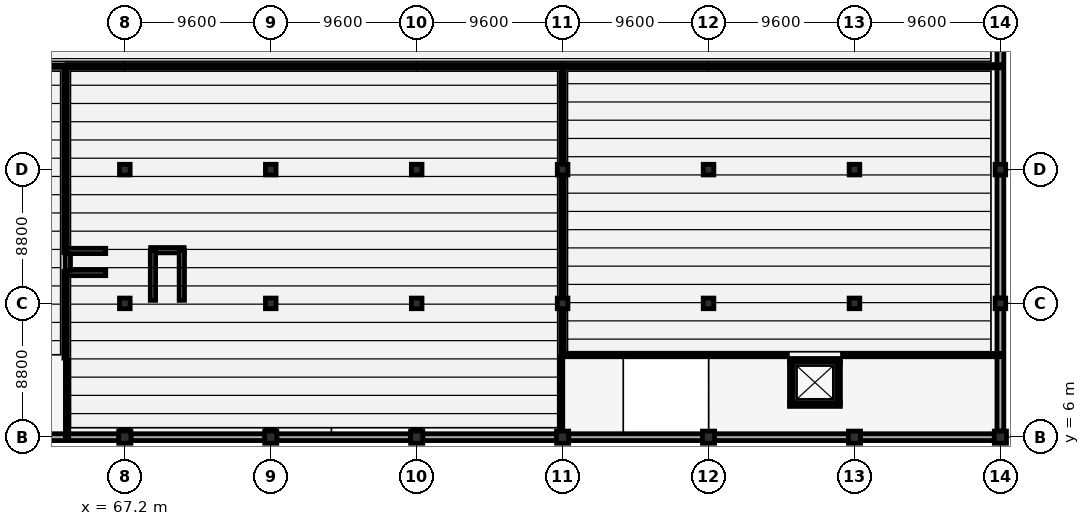
"""IFC4 building model, lengths in metres.
Left out: names, types, materials, properties, quantities, classifications, styles, units other than length and angle.
Written with IfcOpenShell. Run it as: python <this file> out.ifc"""

import sys

from ifc_helpers import new_model, si_unit, direction, frame, frame_2d, origin, origin_2d, place, context, subcontext, project, spatial, rectangle, extrude, element, fill, save


model = new_model("IFC4")
c1 = context("Model", 3, precision=1e-05, world=origin(), true_north=direction((0.0, 1.0)))
c2 = subcontext(c1, "Body", "Model", "MODEL_VIEW")
j1 = project(units=[si_unit("LENGTHUNIT", "METRE"), si_unit("PLANEANGLEUNIT", "RADIAN")], contexts=[c1])
p1 = place(None, origin())
s1 = spatial("IfcSite", under=j1, at=p1, CompositionType="ELEMENT")
p2 = place(p1, origin())
s2 = spatial("IfcBuilding", under=s1, at=p2, CompositionType="ELEMENT")
p3 = place(p2, frame((0.0, 0.0, -4.2)))
s3 = spatial("IfcBuildingStorey", under=s2, at=p3, CompositionType="ELEMENT", Elevation=-4.2)
p4 = place(p3, frame((67.2, 6.0, 0.0), z_axis=(0.0, 0.0, 1.0), x_axis=(1.0, 0.0, 0.0)))
e1 = element("IfcColumn", 1, at=p4, inside=s3, PredefinedType="COLUMN", context=c2, shape_type="SweptSolid", body=[
    extrude(rectangle(XDim=0.8, YDim=0.8, at=origin_2d()), origin(), (0.0, 0.0, 1.0), 4.2),
])
for number, where, z_axis, x_axis in (
    (2, (67.2, 14.8, 0.0), (0.0, 0.0, 1.0), (1.0, 0.0, 0.0)),
    (3, (67.2, 23.6, 0.0), (0.0, 0.0, 1.0), (1.0, 0.0, 0.0)),
):
    element("IfcColumn", number, at=place(p3, frame(where, z_axis=z_axis, x_axis=x_axis)), inside=s3, PredefinedType="COLUMN", context=c2, shape_type="SweptSolid", body=[
        extrude(rectangle(XDim=0.7, YDim=0.7, at=origin_2d()), origin(), (0.0, 0.0, 1.0), 4.2),
    ])
p5 = place(p3, frame((76.8, 6.0, 0.0), z_axis=(0.0, 0.0, 1.0), x_axis=(1.0, 0.0, 0.0)))
e4 = element("IfcColumn", 4, at=p5, inside=s3, PredefinedType="COLUMN", context=c2, shape_type="SweptSolid", body=[
    extrude(rectangle(XDim=0.8, YDim=0.8, at=origin_2d()), origin(), (0.0, 0.0, 1.0), 4.2),
])
for number, where, z_axis, x_axis in (
    (5, (76.8, 14.8, 0.0), (0.0, 0.0, 1.0), (1.0, 0.0, 0.0)),
    (6, (76.8, 23.6, 0.0), (0.0, 0.0, 1.0), (1.0, 0.0, 0.0)),
):
    element("IfcColumn", number, at=place(p3, frame(where, z_axis=z_axis, x_axis=x_axis)), inside=s3, PredefinedType="COLUMN", context=c2, shape_type="SweptSolid", body=[
        extrude(rectangle(XDim=0.7, YDim=0.7, at=origin_2d()), origin(), (0.0, 0.0, 1.0), 4.2),
    ])
p6 = place(p3, frame((86.4, 6.0, 0.0), z_axis=(0.0, 0.0, 1.0), x_axis=(1.0, 0.0, 0.0)))
e7 = element("IfcColumn", 7, at=p6, inside=s3, PredefinedType="COLUMN", context=c2, shape_type="SweptSolid", body=[
    extrude(rectangle(XDim=0.8, YDim=0.8, at=origin_2d()), origin(), (0.0, 0.0, 1.0), 4.2),
])
for number, where, z_axis, x_axis in (
    (8, (86.4, 14.8, 0.0), (0.0, 0.0, 1.0), (1.0, 0.0, 0.0)),
    (9, (86.4, 23.6, 0.0), (0.0, 0.0, 1.0), (1.0, 0.0, 0.0)),
):
    element("IfcColumn", number, at=place(p3, frame(where, z_axis=z_axis, x_axis=x_axis)), inside=s3, PredefinedType="COLUMN", context=c2, shape_type="SweptSolid", body=[
        extrude(rectangle(XDim=0.7, YDim=0.7, at=origin_2d()), origin(), (0.0, 0.0, 1.0), 4.2),
    ])
p7 = place(p3, frame((96.0, 6.0, 0.0), z_axis=(0.0, 0.0, 1.0), x_axis=(1.0, 0.0, 0.0)))
e10 = element("IfcColumn", 10, at=p7, inside=s3, PredefinedType="COLUMN", context=c2, shape_type="SweptSolid", body=[
    extrude(rectangle(XDim=0.8, YDim=0.8, at=origin_2d()), origin(), (0.0, 0.0, 1.0), 4.2),
])
for number, where, z_axis, x_axis in (
    (11, (96.0, 14.8, 0.0), (0.0, 0.0, 1.0), (1.0, 0.0, 0.0)),
    (12, (96.0, 23.6, 0.0), (0.0, 0.0, 1.0), (1.0, 0.0, 0.0)),
):
    element("IfcColumn", number, at=place(p3, frame(where, z_axis=z_axis, x_axis=x_axis)), inside=s3, PredefinedType="COLUMN", context=c2, shape_type="SweptSolid", body=[
        extrude(rectangle(XDim=0.7, YDim=0.7, at=origin_2d()), origin(), (0.0, 0.0, 1.0), 4.2),
    ])
p8 = place(p3, frame((105.6, 6.0, 0.0), z_axis=(0.0, 0.0, 1.0), x_axis=(1.0, 0.0, 0.0)))
e13 = element("IfcColumn", 13, at=p8, inside=s3, PredefinedType="COLUMN", context=c2, shape_type="SweptSolid", body=[
    extrude(rectangle(XDim=0.8, YDim=0.8, at=origin_2d()), origin(), (0.0, 0.0, 1.0), 4.2),
])
for number, where, z_axis, x_axis in (
    (14, (105.6, 14.8, 0.0), (0.0, 0.0, 1.0), (1.0, 0.0, 0.0)),
    (15, (105.6, 23.6, 0.0), (0.0, 0.0, 1.0), (1.0, 0.0, 0.0)),
):
    element("IfcColumn", number, at=place(p3, frame(where, z_axis=z_axis, x_axis=x_axis)), inside=s3, PredefinedType="COLUMN", context=c2, shape_type="SweptSolid", body=[
        extrude(rectangle(XDim=0.7, YDim=0.7, at=origin_2d()), origin(), (0.0, 0.0, 1.0), 4.2),
    ])
p9 = place(p3, frame((115.2, 6.0, 0.0), z_axis=(0.0, 0.0, 1.0), x_axis=(1.0, 0.0, 0.0)))
e16 = element("IfcColumn", 16, at=p9, inside=s3, PredefinedType="COLUMN", context=c2, shape_type="SweptSolid", body=[
    extrude(rectangle(XDim=0.8, YDim=0.8, at=origin_2d()), origin(), (0.0, 0.0, 1.0), 4.2),
])
for number, where, z_axis, x_axis in (
    (17, (115.2, 14.8, 0.0), (0.0, 0.0, 1.0), (1.0, 0.0, 0.0)),
    (18, (115.2, 23.6, 0.0), (0.0, 0.0, 1.0), (1.0, 0.0, 0.0)),
):
    element("IfcColumn", number, at=place(p3, frame(where, z_axis=z_axis, x_axis=x_axis)), inside=s3, PredefinedType="COLUMN", context=c2, shape_type="SweptSolid", body=[
        extrude(rectangle(XDim=0.7, YDim=0.7, at=origin_2d()), origin(), (0.0, 0.0, 1.0), 4.2),
    ])
p10 = place(p3, frame((124.8, 6.0, 0.0), z_axis=(0.0, 0.0, 1.0), x_axis=(1.0, 0.0, 0.0)))
e19 = element("IfcColumn", 19, at=p10, inside=s3, PredefinedType="COLUMN", context=c2, shape_type="SweptSolid", body=[
    extrude(rectangle(XDim=0.8, YDim=0.8, at=origin_2d()), origin(), (0.0, 0.0, 1.0), 4.2),
])
for number, where, z_axis, x_axis in (
    (20, (124.8, 14.8, 0.0), (0.0, 0.0, 1.0), (1.0, 0.0, 0.0)),
    (21, (124.8, 23.6, 0.0), (0.0, 0.0, 1.0), (1.0, 0.0, 0.0)),
):
    element("IfcColumn", number, at=place(p3, frame(where, z_axis=z_axis, x_axis=x_axis)), inside=s3, PredefinedType="COLUMN", context=c2, shape_type="SweptSolid", body=[
        extrude(rectangle(XDim=0.7, YDim=0.7, at=origin_2d()), origin(), (0.0, 0.0, 1.0), 4.2),
    ])
p11 = place(p3, frame((58.0, 6.0, 0.0), z_axis=(0.0, 0.0, 1.0), x_axis=(1.0, 0.0, 0.0)))
e22 = element("IfcWall", 22, at=p11, inside=s3, PredefinedType="SOLIDWALL", context=c2, shape_type="SweptSolid", body=[
    extrude(rectangle(XDim=8.8, YDim=0.45, at=frame_2d((4.4, 0.0))), origin(), (0.0, 0.0, 1.0), 3.84),
])
p12 = place(p3, frame((67.6, 6.0, 0.0), z_axis=(0.0, 0.0, 1.0), x_axis=(1.0, 0.0, 0.0)))
e23 = element("IfcWall", 23, at=p12, inside=s3, PredefinedType="SOLIDWALL", context=c2, shape_type="SweptSolid", body=[
    extrude(rectangle(XDim=8.8, YDim=0.45, at=frame_2d((4.4, 0.0))), origin(), (0.0, 0.0, 1.0), 3.84),
])
for number, where, z_axis, x_axis in (
    (24, (77.2, 6.0, 0.0), (0.0, 0.0, 1.0), (1.0, 0.0, 0.0)),
    (25, (86.8, 6.0, 0.0), (0.0, 0.0, 1.0), (1.0, 0.0, 0.0)),
    (26, (96.4, 6.0, 0.0), (0.0, 0.0, 1.0), (1.0, 0.0, 0.0)),
    (27, (106.0, 6.0, 0.0), (0.0, 0.0, 1.0), (1.0, 0.0, 0.0)),
):
    element("IfcWall", number, at=place(p3, frame(where, z_axis=z_axis, x_axis=x_axis)), inside=s3, PredefinedType="SOLIDWALL", context=c2, shape_type="SweptSolid", body=[
        extrude(rectangle(XDim=8.8, YDim=0.45, at=frame_2d((4.4, 0.0))), origin(), (0.0, 0.0, 1.0), 3.84),
    ])
p13 = place(p3, frame((115.6, 6.0, 0.0), z_axis=(0.0, 0.0, 1.0), x_axis=(1.0, 0.0, 0.0)))
e28 = element("IfcWall", 28, at=p13, inside=s3, PredefinedType="SOLIDWALL", context=c2, shape_type="SweptSolid", body=[
    extrude(rectangle(XDim=8.8, YDim=0.45, at=frame_2d((4.4, 0.0))), origin(), (0.0, 0.0, 1.0), 3.84),
])
p14 = place(p3, frame((124.8, 6.4, 0.0), z_axis=(0.0, 0.0, 1.0), x_axis=(0.0, 1.0, 0.0)))
e29 = element("IfcWall", 29, at=p14, inside=s3, PredefinedType="SOLIDWALL", context=c2, shape_type="SweptSolid", body=[
    extrude(rectangle(XDim=8.05, YDim=0.45, at=frame_2d((4.025, 0.0))), origin(), (0.0, 0.0, 1.0), 3.84),
])
for number, where, z_axis, x_axis in (
    (30, (124.8, 15.15, 0.0), (0.0, 0.0, 1.0), (0.0, 1.0, 0.0)),
    (31, (124.8, 23.95, 0.0), (0.0, 0.0, 1.0), (0.0, 1.0, 0.0)),
):
    element("IfcWall", number, at=place(p3, frame(where, z_axis=z_axis, x_axis=x_axis)), inside=s3, PredefinedType="SOLIDWALL", context=c2, shape_type="SweptSolid", body=[
        extrude(rectangle(XDim=8.1, YDim=0.45, at=frame_2d((4.05, 0.0))), origin(), (0.0, 0.0, 1.0), 3.84),
    ])
for number, where, z_axis, x_axis in (
    (32, (63.275, 16.8, 0.0), (0.0, 0.0, 1.0), (1.0, 0.0, 0.0)),
    (33, (63.275, 18.25, 0.0), (0.0, 0.0, 1.0), (1.0, 0.0, 0.0)),
):
    element("IfcWall", number, at=place(p3, frame(where, z_axis=z_axis, x_axis=x_axis)), inside=s3, PredefinedType="SHEAR", context=c2, shape_type="SweptSolid", body=[
        extrude(rectangle(XDim=2.67, YDim=0.35, at=frame_2d((1.335, 0.0))), origin(), (0.0, 0.0, 1.0), 3.92),
    ])
p15 = place(p3, frame((63.45, 16.975, 0.0), z_axis=(0.0, 0.0, 1.0), x_axis=(0.0, 1.0, 0.0)))
e34 = element("IfcWall", 34, at=p15, inside=s3, PredefinedType="SHEAR", context=c2, shape_type="SweptSolid", body=[
    extrude(rectangle(XDim=1.1, YDim=0.35, at=frame_2d((0.55, 0.0))), origin(), (0.0, 0.0, 1.0), 3.92),
])
p16 = place(p3, frame((68.9, 18.3, 0.0), z_axis=(0.0, 0.0, 1.0), x_axis=(1.0, 0.0, 0.0)))
e35 = element("IfcWall", 35, at=p16, inside=s3, PredefinedType="SHEAR", context=c2, shape_type="SweptSolid", body=[
    extrude(rectangle(XDim=2.2, YDim=0.35, at=frame_2d((1.1, 0.0))), origin(), (0.0, 0.0, 1.0), 3.92),
])
for number, where, z_axis, x_axis in (
    (36, (69.05, 15.0, 0.0), (0.0, 0.0, 1.0), (0.0, 1.0, 0.0)),
    (37, (70.95, 15.0, 0.0), (0.0, 0.0, 1.0), (0.0, 1.0, 0.0)),
):
    element("IfcWall", number, at=place(p3, frame(where, z_axis=z_axis, x_axis=x_axis)), inside=s3, PredefinedType="SHEAR", context=c2, shape_type="SweptSolid", body=[
        extrude(rectangle(XDim=3.3, YDim=0.35, at=frame_2d((1.65, 0.0))), origin(), (0.0, 0.0, 1.0), 3.92),
    ])
p17 = place(p3, frame((114.275, 8.15, -1.5), z_axis=(0.0, 0.0, 1.0), x_axis=(-1.0, 0.0, 0.0)))
e38 = element("IfcWall", 38, at=p17, inside=s3, PredefinedType="SOLIDWALL", context=c2, shape_type="SweptSolid", body=[
    extrude(rectangle(XDim=3.35, YDim=0.25, at=frame_2d((1.675, 0.0))), origin(), (0.0, 0.0, 1.0), 5.45),
])
p18 = place(p3, frame((110.925, 11.05, -1.5), z_axis=(0.0, 0.0, 1.0), x_axis=(1.0, 0.0, 0.0)))
e39 = element("IfcWall", 39, at=p18, inside=s3, PredefinedType="SOLIDWALL", context=c2, shape_type="SweptSolid", body=[
    extrude(rectangle(XDim=3.35, YDim=0.25, at=frame_2d((1.675, 0.0))), origin(), (0.0, 0.0, 1.0), 5.45),
])
p19 = place(p18, frame((0.775, 0.0, 1.5)))
e40 = element("IfcOpeningElement", 40, at=p19, cuts=e39, PredefinedType="OPENING", context=c2, shape_type="SweptSolid", body=[
    extrude(rectangle(XDim=1.8, YDim=2.3, at=frame_2d((0.9, 1.15))), frame((0.0, 0.135, 0.0), z_axis=(0.0, -1.0, 0.0), x_axis=(1.0, 0.0, 0.0)), (0.0, 0.0, 1.0), 0.27),
])
for number, where, z_axis, x_axis in (
    (41, (111.05, 8.275, -1.5), (0.0, 0.0, 1.0), (0.0, 1.0, 0.0)),
    (42, (114.15, 10.925, -1.5), (0.0, 0.0, 1.0), (0.0, -1.0, 0.0)),
):
    element("IfcWall", number, at=place(p3, frame(where, z_axis=z_axis, x_axis=x_axis)), inside=s3, PredefinedType="SOLIDWALL", context=c2, shape_type="SweptSolid", body=[
        extrude(rectangle(XDim=2.65, YDim=0.25, at=frame_2d((1.325, 0.0))), origin(), (0.0, 0.0, 1.0), 5.45),
    ])
p20 = place(p3, frame((63.3, 11.2, 0.0), z_axis=(0.0, 0.0, 1.0), x_axis=(0.0, 1.0, 0.0)))
e43 = element("IfcWall", 43, at=p20, inside=s3, PredefinedType="PARTITIONING", context=c2, shape_type="SweptSolid", body=[
    extrude(rectangle(XDim=5.695, YDim=0.22, at=frame_2d((2.848, 0.0))), origin(), (0.0, 0.0, 1.0), 3.84),
])
p21 = place(p20, frame((2.098, 0.0, 0.0)))
e44 = element("IfcOpeningElement", 44, at=p21, cuts=e43, PredefinedType="OPENING", context=c2, shape_type="SweptSolid", body=[
    extrude(rectangle(XDim=1.5, YDim=2.2, at=frame_2d((0.75, 1.1))), frame((0.0, 0.12, 0.0), z_axis=(0.0, -1.0, 0.0), x_axis=(1.0, 0.0, 0.0)), (0.0, 0.0, 1.0), 0.24),
])
p22 = place(p3, frame((63.3, 18.155, 0.0), z_axis=(0.0, 0.0, 1.0), x_axis=(0.0, 1.0, 0.0)))
e45 = element("IfcWall", 45, at=p22, inside=s3, PredefinedType="PARTITIONING", context=c2, shape_type="SweptSolid", body=[
    extrude(rectangle(XDim=12.145, YDim=0.22, at=frame_2d((6.073, 0.0))), origin(), (0.0, 0.0, 1.0), 3.84),
])
p23 = place(p22, frame((5.323, 0.0, 0.0)))
e46 = element("IfcOpeningElement", 46, at=p23, cuts=e45, PredefinedType="OPENING", context=c2, shape_type="SweptSolid", body=[
    extrude(rectangle(XDim=1.5, YDim=2.2, at=frame_2d((0.75, 1.1))), frame((0.0, 0.12, 0.0), z_axis=(0.0, -1.0, 0.0), x_axis=(1.0, 0.0, 0.0)), (0.0, 0.0, 1.0), 0.24),
])
p24 = place(p3, frame((55.8, 30.4, 0.0), z_axis=(0.0, 0.0, 1.0), x_axis=(1.0, 0.0, 0.0)))
e47 = element("IfcWall", 47, at=p24, inside=s3, PredefinedType="PARTITIONING", context=c2, shape_type="SweptSolid", body=[
    extrude(rectangle(XDim=7.4, YDim=0.16, at=frame_2d((3.7, 0.0))), origin(), (0.0, 0.0, 1.0), 3.84),
])
p25 = place(p24, frame((3.044, 0.0, 0.0)))
e48 = element("IfcOpeningElement", 48, at=p25, cuts=e47, PredefinedType="OPENING", context=c2, shape_type="SweptSolid", body=[
    extrude(rectangle(XDim=1.8, YDim=2.15, at=frame_2d((0.9, 1.075))), frame((0.0, 0.09, 0.0), z_axis=(0.0, -1.0, 0.0), x_axis=(1.0, 0.0, 0.0)), (0.0, 0.0, 1.0), 0.18),
])
p26 = place(p3, frame((96.0, 11.4, 0.0), z_axis=(0.0, 0.0, 1.0), x_axis=(0.0, 1.0, 0.0)))
e49 = element("IfcWall", 49, at=p26, inside=s3, PredefinedType="PARTITIONING", context=c2, shape_type="SweptSolid", body=[
    extrude(rectangle(XDim=18.9, YDim=0.22, at=frame_2d((9.45, 0.0))), origin(), (0.0, 0.0, 1.0), 3.199),
])
p27 = place(p3, frame((63.4, 30.4, 0.0), z_axis=(0.0, 0.0, 1.0), x_axis=(1.0, 0.0, 0.0)))
e50 = element("IfcWall", 50, at=p27, inside=s3, PredefinedType="PARTITIONING", context=c2, shape_type="SweptSolid", body=[
    extrude(rectangle(XDim=32.55, YDim=0.22, at=frame_2d((16.275, 0.0))), origin(), (0.0, 0.0, 1.0), 3.84),
])
p28 = place(p27, frame((15.525, 0.0, 0.0)))
e51 = element("IfcOpeningElement", 51, at=p28, cuts=e50, PredefinedType="OPENING", context=c2, shape_type="SweptSolid", body=[
    extrude(rectangle(XDim=1.5, YDim=2.2, at=frame_2d((0.75, 1.1))), frame((0.0, 0.12, 0.0), z_axis=(0.0, -1.0, 0.0), x_axis=(1.0, 0.0, 0.0)), (0.0, 0.0, 1.0), 0.24),
])
p29 = place(p3, frame((96.03, 30.4, 0.0), z_axis=(0.0, 0.0, 1.0), x_axis=(1.0, 0.0, 0.0)))
e52 = element("IfcWall", 52, at=p29, inside=s3, PredefinedType="PARTITIONING", context=c2, shape_type="SweptSolid", body=[
    extrude(rectangle(XDim=28.72, YDim=0.22, at=frame_2d((14.36, 0.0))), origin(), (0.0, 0.0, 1.0), 3.84),
])
p30 = place(p29, frame((13.61, 0.0, 0.0)))
e53 = element("IfcOpeningElement", 53, at=p30, cuts=e52, PredefinedType="OPENING", context=c2, shape_type="SweptSolid", body=[
    extrude(rectangle(XDim=1.5, YDim=2.2, at=frame_2d((0.75, 1.1))), frame((0.0, 0.12, 0.0), z_axis=(0.0, -1.0, 0.0), x_axis=(1.0, 0.0, 0.0)), (0.0, 0.0, 1.0), 0.24),
])
for number, where, z_axis, x_axis in (
    (54, (66.94, 6.4, 0.0), (0.0, 0.0, 1.0), (1.0, 0.0, 0.0)),
    (55, (76.54, 6.4, 0.0), (0.0, 0.0, 1.0), (1.0, 0.0, 0.0)),
    (56, (86.14, 6.4, 0.0), (0.0, 0.0, 1.0), (1.0, 0.0, 0.0)),
):
    element("IfcWall", number, at=place(p3, frame(where, z_axis=z_axis, x_axis=x_axis)), inside=s3, PredefinedType="PARTITIONING", context=c2, shape_type="SweptSolid", body=[
        extrude(rectangle(XDim=0.52, YDim=0.22, at=frame_2d((0.26, 0.0))), origin(), (0.0, 0.0, 1.0), 3.84),
    ])
p31 = place(p3, frame((63.4, 6.05, 0.0), z_axis=(0.0, 0.0, 1.0), x_axis=(0.0, 1.0, 0.0)))
e57 = element("IfcWall", 57, at=p31, inside=s3, PredefinedType="PARTITIONING", context=c2, shape_type="SweptSolid", body=[
    extrude(rectangle(XDim=5.01, YDim=0.22, at=frame_2d((2.505, 0.0))), origin(), (0.0, 0.0, 1.0), 3.84),
])
p32 = place(p3, frame((95.9, 6.05, 0.0), z_axis=(0.0, 0.0, 1.0), x_axis=(0.0, 1.0, 0.0)))
e58 = element("IfcWall", 58, at=p32, inside=s3, PredefinedType="PARTITIONING", context=c2, shape_type="SweptSolid", body=[
    extrude(rectangle(XDim=5.21, YDim=0.22, at=frame_2d((2.605, 0.0))), origin(), (0.0, 0.0, 1.0), 3.199),
])
p33 = place(p3, frame((95.95, 11.4, 0.0), z_axis=(0.0, 0.0, 1.0), x_axis=(1.0, 0.0, 0.0)))
e59 = element("IfcWall", 59, at=p33, inside=s3, PredefinedType="PARTITIONING", context=c2, shape_type="SweptSolid", body=[
    extrude(rectangle(XDim=14.835, YDim=0.22, at=frame_2d((7.417, 0.0))), origin(), (0.0, 0.0, 1.0), 3.84),
])
p34 = place(p3, frame((114.415, 11.4, 0.0), z_axis=(0.0, 0.0, 1.0), x_axis=(1.0, 0.0, 0.0)))
e60 = element("IfcWall", 60, at=p34, inside=s3, PredefinedType="PARTITIONING", context=c2, shape_type="SweptSolid", body=[
    extrude(rectangle(XDim=10.335, YDim=0.22, at=frame_2d((5.167, 0.0))), origin(), (0.0, 0.0, 1.0), 3.84),
])
p35 = place(p19, origin())
e61 = element("IfcDoor", 61, at=p35, inside=s3, OperationType="DOUBLE_DOOR_SLIDING", PredefinedType="DOOR", context=c2, shape_type="SweptSolid", body=[
    extrude(rectangle(XDim=1.8, YDim=2.3, at=frame_2d((0.9, 1.15))), frame((0.0, 0.025, 0.0), z_axis=(0.0, -1.0, 0.0), x_axis=(1.0, 0.0, 0.0)), (0.0, 0.0, 1.0), 0.05),
])
fill(e40, e61)
p36 = place(p21, origin())
e62 = element("IfcDoor", 62, at=p36, inside=s3, OperationType="SLIDING_TO_RIGHT", PredefinedType="DOOR", context=c2, shape_type="SweptSolid", body=[
    extrude(rectangle(XDim=1.5, YDim=2.2, at=frame_2d((0.75, 1.1))), frame((0.0, 0.025, 0.0), z_axis=(0.0, -1.0, 0.0), x_axis=(1.0, 0.0, 0.0)), (0.0, 0.0, 1.0), 0.05),
])
fill(e44, e62)
p37 = place(p23, origin())
e63 = element("IfcDoor", 63, at=p37, inside=s3, OperationType="SLIDING_TO_RIGHT", PredefinedType="DOOR", context=c2, shape_type="SweptSolid", body=[
    extrude(rectangle(XDim=1.5, YDim=2.2, at=frame_2d((0.75, 1.1))), frame((0.0, 0.025, 0.0), z_axis=(0.0, -1.0, 0.0), x_axis=(1.0, 0.0, 0.0)), (0.0, 0.0, 1.0), 0.05),
])
fill(e46, e63)
p38 = place(p28, origin())
e64 = element("IfcDoor", 64, at=p38, inside=s3, OperationType="SLIDING_TO_RIGHT", PredefinedType="DOOR", context=c2, shape_type="SweptSolid", body=[
    extrude(rectangle(XDim=1.5, YDim=2.2, at=frame_2d((0.75, 1.1))), frame((0.0, 0.025, 0.0), z_axis=(0.0, -1.0, 0.0), x_axis=(1.0, 0.0, 0.0)), (0.0, 0.0, 1.0), 0.05),
])
fill(e51, e64)
p39 = place(p30, origin())
e65 = element("IfcDoor", 65, at=p39, inside=s3, OperationType="SLIDING_TO_RIGHT", PredefinedType="DOOR", context=c2, shape_type="SweptSolid", body=[
    extrude(rectangle(XDim=1.5, YDim=2.2, at=frame_2d((0.75, 1.1))), frame((0.0, 0.025, 0.0), z_axis=(0.0, -1.0, 0.0), x_axis=(1.0, 0.0, 0.0)), (0.0, 0.0, 1.0), 0.05),
])
fill(e53, e65)
save(model, sys.argv[1])
